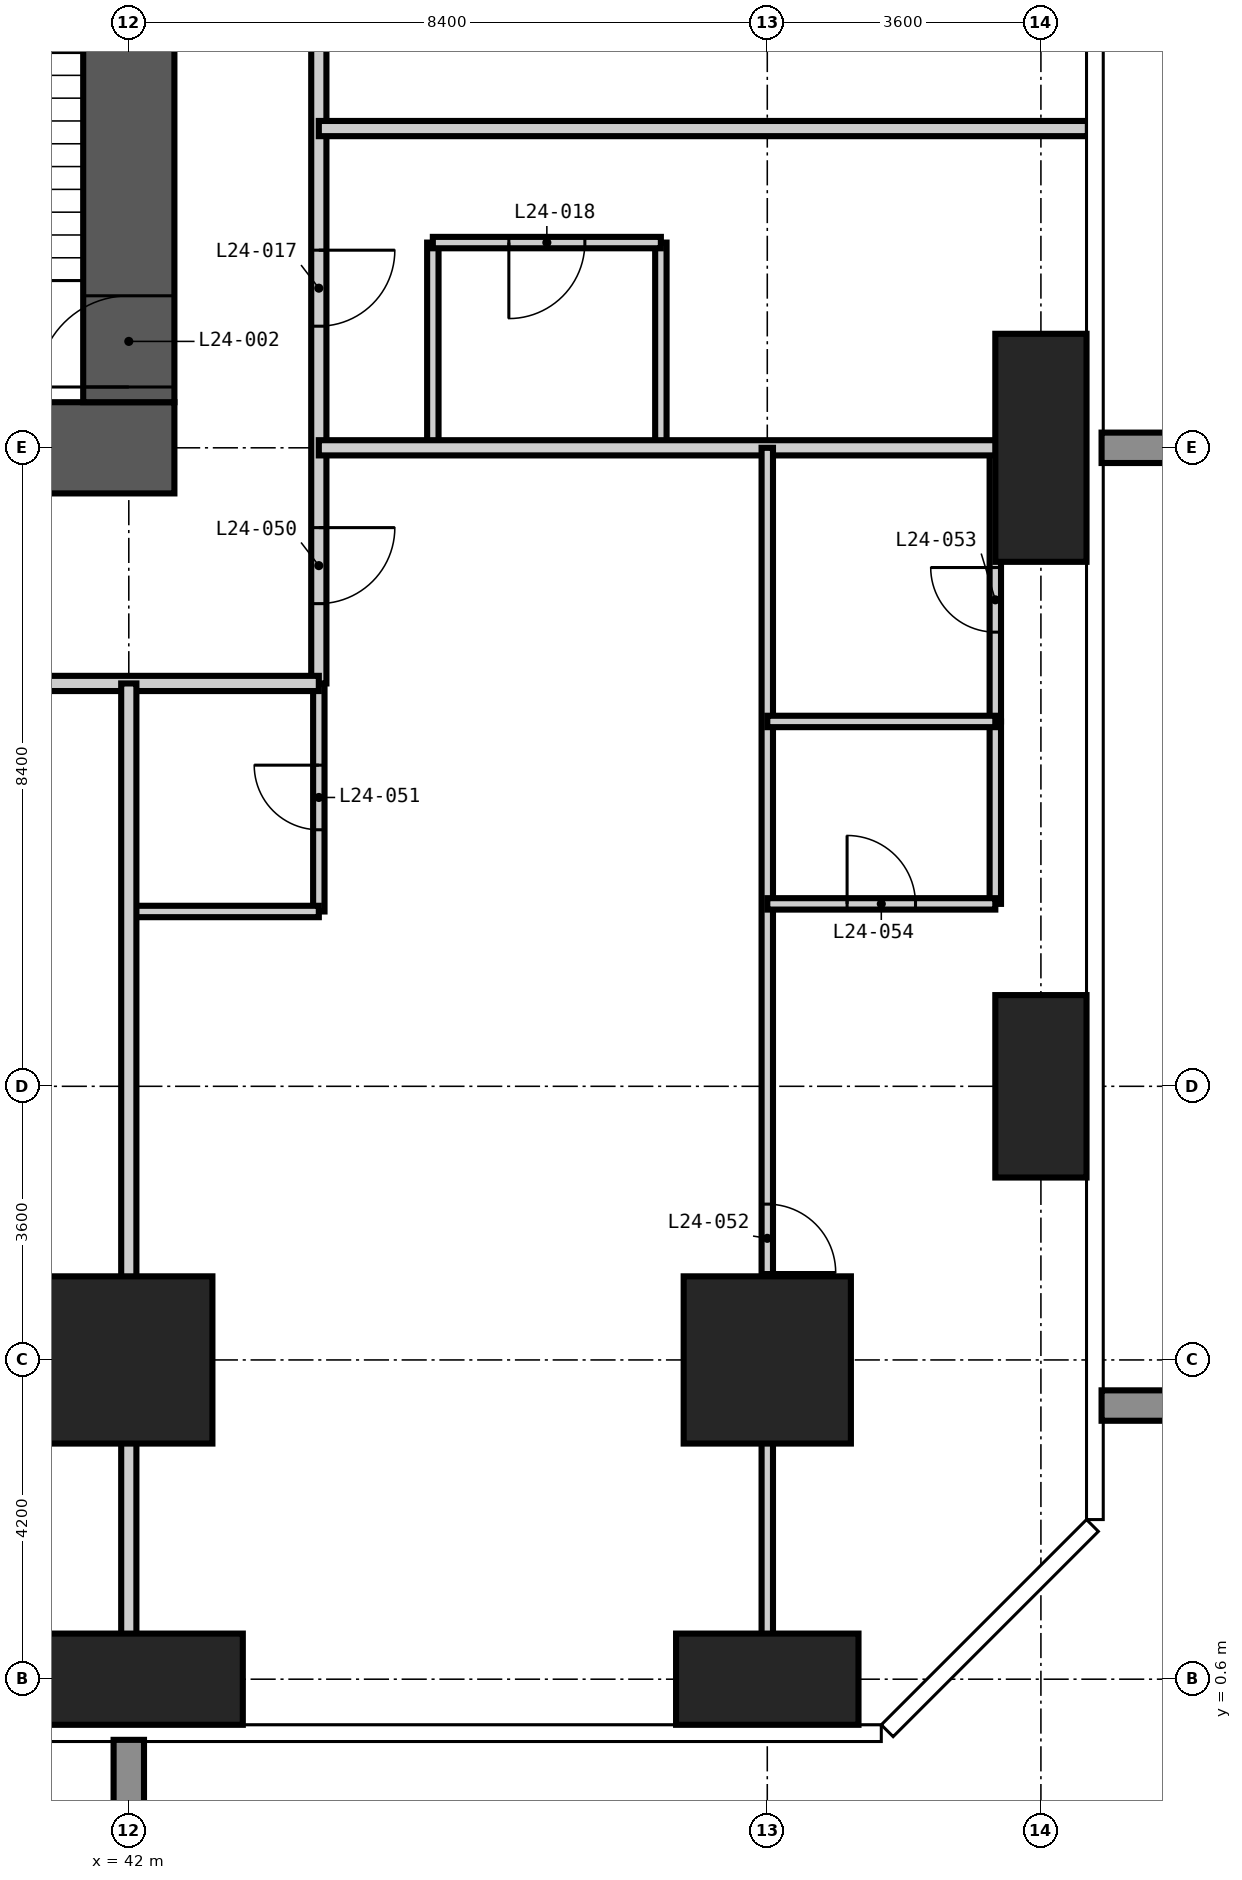
"""IFC4 building model, lengths in metres.
Left out: names, types, materials, properties, quantities, classifications, styles, units other than length and angle.
Written with IfcOpenShell. Run it as: python <this file> out.ifc"""

import sys

from ifc_helpers import new_model, si_unit, direction, frame, frame_2d, origin, origin_2d, place, context, subcontext, project, spatial, rectangle, extrude, element, fill, save


model = new_model("IFC4")
c1 = context("Model", 3, precision=1e-05, world=origin(), true_north=direction((0.0, 1.0)))
c2 = subcontext(c1, "Body", "Model", "MODEL_VIEW")
j1 = project(units=[si_unit("LENGTHUNIT", "METRE"), si_unit("PLANEANGLEUNIT", "RADIAN")], contexts=[c1])
p1 = place(None, origin())
s1 = spatial("IfcSite", under=j1, at=p1, CompositionType="ELEMENT")
p2 = place(p1, origin())
s2 = spatial("IfcBuilding", under=s1, at=p2, CompositionType="ELEMENT")
p3 = place(p2, frame((0.0, 0.0, 97.2)))
s3 = spatial("IfcBuildingStorey", under=s2, at=p3, CompositionType="ELEMENT", Elevation=97.2)
p4 = place(p3, frame((42.0, 0.6, -0.35), z_axis=(0.0, 0.0, 1.0), x_axis=(1.0, 0.0, 0.0)))
e1 = element("IfcColumn", 1, at=p4, inside=s3, PredefinedType="COLUMN", context=c2, shape_type="SweptSolid", body=[
    extrude(rectangle(XDim=3.0, YDim=1.2, at=origin_2d()), origin(), (0.0, 0.0, 1.0), 3.6),
])
p5 = place(p3, frame((42.0, 4.8, -0.35), z_axis=(0.0, 0.0, 1.0), x_axis=(1.0, 0.0, 0.0)))
e2 = element("IfcColumn", 2, at=p5, inside=s3, PredefinedType="COLUMN", context=c2, shape_type="SweptSolid", body=[
    extrude(rectangle(XDim=2.2, YDim=2.2, at=origin_2d()), origin(), (0.0, 0.0, 1.0), 3.6),
])
p6 = place(p3, frame((50.4, 0.6, -0.35), z_axis=(0.0, 0.0, 1.0), x_axis=(1.0, 0.0, 0.0)))
e3 = element("IfcColumn", 3, at=p6, inside=s3, PredefinedType="COLUMN", context=c2, shape_type="SweptSolid", body=[
    extrude(rectangle(XDim=2.4, YDim=1.2, at=origin_2d()), origin(), (0.0, 0.0, 1.0), 3.6),
])
p7 = place(p3, frame((50.4, 4.8, -0.35), z_axis=(0.0, 0.0, 1.0), x_axis=(1.0, 0.0, 0.0)))
e4 = element("IfcColumn", 4, at=p7, inside=s3, PredefinedType="COLUMN", context=c2, shape_type="SweptSolid", body=[
    extrude(rectangle(XDim=2.2, YDim=2.2, at=origin_2d()), origin(), (0.0, 0.0, 1.0), 3.6),
])
p8 = place(p3, frame((54.0, 8.4, -0.35), z_axis=(0.0, 0.0, 1.0), x_axis=(1.0, 0.0, 0.0)))
e5 = element("IfcColumn", 5, at=p8, inside=s3, PredefinedType="COLUMN", context=c2, shape_type="SweptSolid", body=[
    extrude(rectangle(XDim=1.2, YDim=2.4, at=origin_2d()), origin(), (0.0, 0.0, 1.0), 3.6),
])
p9 = place(p3, frame((54.0, 16.8, -0.35), z_axis=(0.0, 0.0, 1.0), x_axis=(1.0, 0.0, 0.0)))
e6 = element("IfcColumn", 6, at=p9, inside=s3, PredefinedType="COLUMN", context=c2, shape_type="SweptSolid", body=[
    extrude(rectangle(XDim=1.2, YDim=3.0, at=origin_2d()), origin(), (0.0, 0.0, 1.0), 3.6),
])
p10 = place(p3, frame((16.2, 16.8, -0.35), z_axis=(0.0, 0.0, 1.0), x_axis=(1.0, 0.0, 0.0)))
e7 = element("IfcWall", 7, at=p10, inside=s3, PredefinedType="SHEAR", context=c2, shape_type="SweptSolid", body=[
    extrude(rectangle(XDim=26.4, YDim=1.2, at=frame_2d((13.2, 0.0))), origin(), (0.0, 0.0, 1.0), 3.6),
])
p11 = place(p10, frame((12.7, 0.0, 0.35)))
e8 = element("IfcOpeningElement", 8, at=p11, cuts=e7, PredefinedType="OPENING", context=c2, shape_type="SweptSolid", body=[
    extrude(rectangle(XDim=1.0, YDim=2.1, at=frame_2d((0.5, 1.05))), frame((0.0, 0.61, 0.0), z_axis=(0.0, -1.0, 0.0), x_axis=(1.0, 0.0, 0.0)), (0.0, 0.0, 1.0), 1.22),
])
p12 = place(p10, frame((19.0, 0.0, 0.35)))
e9 = element("IfcOpeningElement", 9, at=p12, cuts=e7, PredefinedType="OPENING", context=c2, shape_type="SweptSolid", body=[
    extrude(rectangle(XDim=1.0, YDim=2.1, at=frame_2d((0.5, 1.05))), frame((0.0, 0.61, 0.0), z_axis=(0.0, -1.0, 0.0), x_axis=(1.0, 0.0, 0.0)), (0.0, 0.0, 1.0), 1.22),
])
p13 = place(p3, frame((42.0, 17.4, -0.35), z_axis=(0.0, 0.0, 1.0), x_axis=(0.0, 1.0, 0.0)))
e10 = element("IfcWall", 10, at=p13, inside=s3, PredefinedType="SHEAR", context=c2, shape_type="SweptSolid", body=[
    extrude(rectangle(XDim=24.0, YDim=1.2, at=frame_2d((12.0, 0.0))), origin(), (0.0, 0.0, 1.0), 3.6),
])
p14 = place(p13, frame((0.2, 0.0, 0.35)))
e11 = element("IfcOpeningElement", 11, at=p14, cuts=e10, PredefinedType="OPENING", context=c2, shape_type="SweptSolid", body=[
    extrude(rectangle(XDim=1.2, YDim=2.2, at=frame_2d((0.6, 1.1))), frame((0.0, 0.61, 0.0), z_axis=(0.0, -1.0, 0.0), x_axis=(1.0, 0.0, 0.0)), (0.0, 0.0, 1.0), 1.22),
])
p15 = place(p13, frame((11.1, 0.0, 0.35)))
e12 = element("IfcOpeningElement", 12, at=p15, cuts=e10, PredefinedType="OPENING", context=c2, shape_type="SweptSolid", body=[
    extrude(rectangle(XDim=1.8, YDim=2.2, at=frame_2d((0.9, 1.1))), frame((0.0, 0.61, 0.0), z_axis=(0.0, -1.0, 0.0), x_axis=(1.0, 0.0, 0.0)), (0.0, 0.0, 1.0), 1.22),
])
p16 = place(p13, frame((19.9, 0.0, 0.35)))
e13 = element("IfcOpeningElement", 13, at=p16, cuts=e10, PredefinedType="OPENING", context=c2, shape_type="SweptSolid", body=[
    extrude(rectangle(XDim=1.0, YDim=2.1, at=frame_2d((0.5, 1.05))), frame((0.0, 0.61, 0.0), z_axis=(0.0, -1.0, 0.0), x_axis=(1.0, 0.0, 0.0)), (0.0, 0.0, 1.0), 1.22),
])
p17 = place(p3, frame((44.5, 10.7, 0.0), z_axis=(0.0, 0.0, 1.0), x_axis=(0.0, 1.0, 0.0)))
e14 = element("IfcWall", 14, at=p17, inside=s3, PredefinedType="PARTITIONING", context=c2, shape_type="SweptSolid", body=[
    extrude(rectangle(XDim=3.0, YDim=0.15, at=frame_2d((1.5, 0.0))), origin(), (0.0, 0.0, 1.0), 3.25),
])
p18 = place(p17, frame((1.075, 0.0, 0.0)))
e15 = element("IfcOpeningElement", 15, at=p18, cuts=e14, PredefinedType="OPENING", context=c2, shape_type="SweptSolid", body=[
    extrude(rectangle(XDim=0.85, YDim=2.1, at=frame_2d((0.425, 1.05))), frame((0.0, 0.085, 0.0), z_axis=(0.0, -1.0, 0.0), x_axis=(1.0, 0.0, 0.0)), (0.0, 0.0, 1.0), 0.17),
])
for number, where, z_axis, x_axis in (
    (16, (46.0, 16.8, 0.0), (0.0, 0.0, 1.0), (0.0, 1.0, 0.0)),
    (17, (49.0, 16.8, 0.0), (0.0, 0.0, 1.0), (0.0, 1.0, 0.0)),
):
    element("IfcWall", number, at=place(p3, frame(where, z_axis=z_axis, x_axis=x_axis)), inside=s3, PredefinedType="PARTITIONING", context=c2, shape_type="SweptSolid", body=[
        extrude(rectangle(XDim=2.7, YDim=0.15, at=frame_2d((1.35, 0.0))), origin(), (0.0, 0.0, 1.0), 3.25),
    ])
p19 = place(p3, frame((53.4, 13.2, 0.0), z_axis=(0.0, 0.0, 1.0), x_axis=(0.0, 1.0, 0.0)))
e18 = element("IfcWall", 18, at=p19, inside=s3, PredefinedType="PARTITIONING", context=c2, shape_type="SweptSolid", body=[
    extrude(rectangle(XDim=3.6, YDim=0.15, at=frame_2d((1.8, 0.0))), origin(), (0.0, 0.0, 1.0), 3.25),
])
p20 = place(p19, frame((1.175, 0.0, 0.0)))
e19 = element("IfcOpeningElement", 19, at=p20, cuts=e18, PredefinedType="OPENING", context=c2, shape_type="SweptSolid", body=[
    extrude(rectangle(XDim=0.85, YDim=2.1, at=frame_2d((0.425, 1.05))), frame((0.0, 0.085, 0.0), z_axis=(0.0, -1.0, 0.0), x_axis=(1.0, 0.0, 0.0)), (0.0, 0.0, 1.0), 0.17),
])
p21 = place(p3, frame((42.0, 10.7, 0.0), z_axis=(0.0, 0.0, 1.0), x_axis=(1.0, 0.0, 0.0)))
e20 = element("IfcWall", 20, at=p21, inside=s3, PredefinedType="PARTITIONING", context=c2, shape_type="SweptSolid", body=[
    extrude(rectangle(XDim=2.5, YDim=0.15, at=frame_2d((1.25, 0.0))), origin(), (0.0, 0.0, 1.0), 3.25),
])
p22 = place(p3, frame((46.0, 19.5, 0.0), z_axis=(0.0, 0.0, 1.0), x_axis=(1.0, 0.0, 0.0)))
e21 = element("IfcWall", 21, at=p22, inside=s3, PredefinedType="PARTITIONING", context=c2, shape_type="SweptSolid", body=[
    extrude(rectangle(XDim=3.0, YDim=0.15, at=frame_2d((1.5, 0.0))), origin(), (0.0, 0.0, 1.0), 3.25),
])
p23 = place(p22, frame((1.0, 0.0, 0.0)))
e22 = element("IfcOpeningElement", 22, at=p23, cuts=e21, PredefinedType="OPENING", context=c2, shape_type="SweptSolid", body=[
    extrude(rectangle(XDim=1.0, YDim=2.1, at=frame_2d((0.5, 1.05))), frame((0.0, 0.085, 0.0), z_axis=(0.0, -1.0, 0.0), x_axis=(1.0, 0.0, 0.0)), (0.0, 0.0, 1.0), 0.17),
])
p24 = place(p3, frame((44.5, 45.7, 0.0), z_axis=(0.0, 0.0, 1.0), x_axis=(0.0, -1.0, 0.0)))
e23 = element("IfcWall", 23, at=p24, inside=s3, PredefinedType="PARTITIONING", context=c2, shape_type="SweptSolid", body=[
    extrude(rectangle(XDim=32.0, YDim=0.2, at=frame_2d((16.0, 0.0))), origin(), (0.0, 0.0, 1.0), 3.25),
])
p25 = place(p24, frame((26.3, 0.0, 0.0)))
e24 = element("IfcOpeningElement", 24, at=p25, cuts=e23, PredefinedType="OPENING", context=c2, shape_type="SweptSolid", body=[
    extrude(rectangle(XDim=1.0, YDim=2.2, at=frame_2d((0.5, 1.1))), frame((0.0, 0.11, 0.0), z_axis=(0.0, -1.0, 0.0), x_axis=(1.0, 0.0, 0.0)), (0.0, 0.0, 1.0), 0.22),
])
p26 = place(p24, frame((20.0, 0.0, 0.0)))
e25 = element("IfcOpeningElement", 25, at=p26, cuts=e23, PredefinedType="OPENING", context=c2, shape_type="SweptSolid", body=[
    extrude(rectangle(XDim=1.0, YDim=2.2, at=frame_2d((0.5, 1.1))), frame((0.0, 0.11, 0.0), z_axis=(0.0, -1.0, 0.0), x_axis=(1.0, 0.0, 0.0)), (0.0, 0.0, 1.0), 0.22),
])
p27 = place(p24, frame((11.6, 0.0, 0.0)))
e26 = element("IfcOpeningElement", 26, at=p27, cuts=e23, PredefinedType="OPENING", context=c2, shape_type="SweptSolid", body=[
    extrude(rectangle(XDim=1.0, YDim=2.2, at=frame_2d((0.5, 1.1))), frame((0.0, 0.11, 0.0), z_axis=(0.0, -1.0, 0.0), x_axis=(1.0, 0.0, 0.0)), (0.0, 0.0, 1.0), 0.22),
])
p28 = place(p24, frame((5.3, 0.0, 0.0)))
e27 = element("IfcOpeningElement", 27, at=p28, cuts=e23, PredefinedType="OPENING", context=c2, shape_type="SweptSolid", body=[
    extrude(rectangle(XDim=1.0, YDim=2.2, at=frame_2d((0.5, 1.1))), frame((0.0, 0.11, 0.0), z_axis=(0.0, -1.0, 0.0), x_axis=(1.0, 0.0, 0.0)), (0.0, 0.0, 1.0), 0.22),
])
p29 = place(p24, frame((29.95, 0.0, 0.0)))
e28 = element("IfcOpeningElement", 28, at=p29, cuts=e23, PredefinedType="OPENING", context=c2, shape_type="SweptSolid", body=[
    extrude(rectangle(XDim=1.0, YDim=2.2, at=frame_2d((0.5, 1.1))), frame((0.0, 0.11, 0.0), z_axis=(0.0, -1.0, 0.0), x_axis=(1.0, 0.0, 0.0)), (0.0, 0.0, 1.0), 0.22),
])
p30 = place(p24, frame((1.35, 0.0, 0.0)))
e29 = element("IfcOpeningElement", 29, at=p30, cuts=e23, PredefinedType="OPENING", context=c2, shape_type="SweptSolid", body=[
    extrude(rectangle(XDim=1.0, YDim=2.2, at=frame_2d((0.5, 1.1))), frame((0.0, 0.11, 0.0), z_axis=(0.0, -1.0, 0.0), x_axis=(1.0, 0.0, 0.0)), (0.0, 0.0, 1.0), 0.22),
])
p31 = place(p3, frame((44.5, 13.7, 0.0), z_axis=(0.0, 0.0, 1.0), x_axis=(-1.0, 0.0, 0.0)))
e30 = element("IfcWall", 30, at=p31, inside=s3, PredefinedType="PARTITIONING", context=c2, shape_type="SweptSolid", body=[
    extrude(rectangle(XDim=31.9, YDim=0.2, at=frame_2d((15.95, 0.0))), origin(), (0.0, 0.0, 1.0), 3.25),
])
p32 = place(p31, frame((23.0, 0.0, 0.0)))
e31 = element("IfcOpeningElement", 31, at=p32, cuts=e30, PredefinedType="OPENING", context=c2, shape_type="SweptSolid", body=[
    extrude(rectangle(XDim=1.0, YDim=2.2, at=frame_2d((0.5, 1.1))), frame((0.0, 0.11, 0.0), z_axis=(0.0, -1.0, 0.0), x_axis=(1.0, 0.0, 0.0)), (0.0, 0.0, 1.0), 0.22),
])
p33 = place(p31, frame((14.6, 0.0, 0.0)))
e32 = element("IfcOpeningElement", 32, at=p33, cuts=e30, PredefinedType="OPENING", context=c2, shape_type="SweptSolid", body=[
    extrude(rectangle(XDim=1.0, YDim=2.2, at=frame_2d((0.5, 1.1))), frame((0.0, 0.11, 0.0), z_axis=(0.0, -1.0, 0.0), x_axis=(1.0, 0.0, 0.0)), (0.0, 0.0, 1.0), 0.22),
])
p34 = place(p31, frame((6.2, 0.0, 0.0)))
e33 = element("IfcOpeningElement", 33, at=p34, cuts=e30, PredefinedType="OPENING", context=c2, shape_type="SweptSolid", body=[
    extrude(rectangle(XDim=1.0, YDim=2.2, at=frame_2d((0.5, 1.1))), frame((0.0, 0.11, 0.0), z_axis=(0.0, -1.0, 0.0), x_axis=(1.0, 0.0, 0.0)), (0.0, 0.0, 1.0), 0.22),
])
p35 = place(p3, frame((42.0, -0.018, 0.0), z_axis=(0.0, 0.0, 1.0), x_axis=(0.0, 1.0, 0.0)))
e34 = element("IfcWall", 34, at=p35, inside=s3, PredefinedType="PARTITIONING", context=c2, shape_type="SweptSolid", body=[
    extrude(rectangle(XDim=13.718, YDim=0.2, at=frame_2d((6.859, 0.0))), origin(), (0.0, 0.0, 1.0), 3.25),
])
for number, where, z_axis, x_axis in (
    (35, (44.5, 16.8, 0.0), (0.0, 0.0, 1.0), (1.0, 0.0, 0.0)),
    (36, (44.5, 21.0, 0.0), (0.0, 0.0, 1.0), (1.0, 0.0, 0.0)),
):
    element("IfcWall", number, at=place(p3, frame(where, z_axis=z_axis, x_axis=x_axis)), inside=s3, PredefinedType="PARTITIONING", context=c2, shape_type="SweptSolid", body=[
        extrude(rectangle(XDim=10.118, YDim=0.2, at=frame_2d((5.059, 0.0))), origin(), (0.0, 0.0, 1.0), 3.25),
    ])
p36 = place(p3, frame((50.4, -0.018, 0.0), z_axis=(0.0, 0.0, 1.0), x_axis=(0.0, 1.0, 0.0)))
e37 = element("IfcWall", 37, at=p36, inside=s3, PredefinedType="PARTITIONING", context=c2, shape_type="SweptSolid", body=[
    extrude(rectangle(XDim=16.818, YDim=0.15, at=frame_2d((8.409, 0.0))), origin(), (0.0, 0.0, 1.0), 3.25),
])
p37 = place(p36, frame((5.968, 0.0, 0.0)))
e38 = element("IfcOpeningElement", 38, at=p37, cuts=e37, PredefinedType="OPENING", context=c2, shape_type="SweptSolid", body=[
    extrude(rectangle(XDim=0.9, YDim=2.1, at=frame_2d((0.45, 1.05))), frame((0.0, 0.085, 0.0), z_axis=(0.0, -1.0, 0.0), x_axis=(1.0, 0.0, 0.0)), (0.0, 0.0, 1.0), 0.17),
])
p38 = place(p3, frame((53.4, 10.8, 0.0), z_axis=(0.0, 0.0, 1.0), x_axis=(0.0, 1.0, 0.0)))
e39 = element("IfcWall", 39, at=p38, inside=s3, PredefinedType="PARTITIONING", context=c2, shape_type="SweptSolid", body=[
    extrude(rectangle(XDim=2.4, YDim=0.15, at=frame_2d((1.2, 0.0))), origin(), (0.0, 0.0, 1.0), 3.25),
])
p39 = place(p3, frame((50.4, 10.8, 0.0), z_axis=(0.0, 0.0, 1.0), x_axis=(1.0, 0.0, 0.0)))
e40 = element("IfcWall", 40, at=p39, inside=s3, PredefinedType="PARTITIONING", context=c2, shape_type="SweptSolid", body=[
    extrude(rectangle(XDim=3.0, YDim=0.15, at=frame_2d((1.5, 0.0))), origin(), (0.0, 0.0, 1.0), 3.25),
])
p40 = place(p39, frame((1.05, 0.0, 0.0)))
e41 = element("IfcOpeningElement", 41, at=p40, cuts=e40, PredefinedType="OPENING", context=c2, shape_type="SweptSolid", body=[
    extrude(rectangle(XDim=0.9, YDim=2.1, at=frame_2d((0.45, 1.05))), frame((0.0, 0.085, 0.0), z_axis=(0.0, -1.0, 0.0), x_axis=(1.0, 0.0, 0.0)), (0.0, 0.0, 1.0), 0.17),
])
p41 = place(p3, frame((50.4, 13.2, 0.0), z_axis=(0.0, 0.0, 1.0), x_axis=(1.0, 0.0, 0.0)))
e42 = element("IfcWall", 42, at=p41, inside=s3, PredefinedType="PARTITIONING", context=c2, shape_type="SweptSolid", body=[
    extrude(rectangle(XDim=3.0, YDim=0.15, at=frame_2d((1.5, 0.0))), origin(), (0.0, 0.0, 1.0), 3.25),
])
p42 = place(p14, origin())
e43 = element("IfcDoor", 43, at=p42, inside=s3, OperationType="SINGLE_SWING_LEFT", PredefinedType="DOOR", context=c2, shape_type="SweptSolid", body=[
    extrude(rectangle(XDim=1.2, YDim=2.2, at=frame_2d((0.6, 1.1))), frame((0.0, 0.025, 0.0), z_axis=(0.0, -1.0, 0.0), x_axis=(1.0, 0.0, 0.0)), (0.0, 0.0, 1.0), 0.05),
])
fill(e11, e43)
p43 = place(p25, origin())
e44 = element("IfcDoor", 44, at=p43, inside=s3, OperationType="SINGLE_SWING_LEFT", PredefinedType="DOOR", context=c2, shape_type="SweptSolid", body=[
    extrude(rectangle(XDim=1.0, YDim=2.2, at=frame_2d((0.5, 1.1))), frame((0.0, 0.025, 0.0), z_axis=(0.0, -1.0, 0.0), x_axis=(1.0, 0.0, 0.0)), (0.0, 0.0, 1.0), 0.05),
])
fill(e24, e44)
p44 = place(p23, frame((1.0, 0.0, 0.0), z_axis=(0.0, 0.0, 1.0), x_axis=(-1.0, 0.0, 0.0)))
e45 = element("IfcDoor", 45, at=p44, inside=s3, OperationType="SINGLE_SWING_RIGHT", PredefinedType="DOOR", context=c2, shape_type="SweptSolid", body=[
    extrude(rectangle(XDim=1.0, YDim=2.1, at=frame_2d((0.5, 1.05))), frame((0.0, 0.025, 0.0), z_axis=(0.0, -1.0, 0.0), x_axis=(1.0, 0.0, 0.0)), (0.0, 0.0, 1.0), 0.05),
])
fill(e22, e45)
p45 = place(p29, origin())
e46 = element("IfcDoor", 46, at=p45, inside=s3, OperationType="SINGLE_SWING_LEFT", PredefinedType="DOOR", context=c2, shape_type="SweptSolid", body=[
    extrude(rectangle(XDim=1.0, YDim=2.2, at=frame_2d((0.5, 1.1))), frame((0.0, 0.025, 0.0), z_axis=(0.0, -1.0, 0.0), x_axis=(1.0, 0.0, 0.0)), (0.0, 0.0, 1.0), 0.05),
])
fill(e28, e46)
p46 = place(p18, origin())
e47 = element("IfcDoor", 47, at=p46, inside=s3, OperationType="SINGLE_SWING_RIGHT", PredefinedType="DOOR", context=c2, shape_type="SweptSolid", body=[
    extrude(rectangle(XDim=0.85, YDim=2.1, at=frame_2d((0.425, 1.05))), frame((0.0, 0.025, 0.0), z_axis=(0.0, -1.0, 0.0), x_axis=(1.0, 0.0, 0.0)), (0.0, 0.0, 1.0), 0.05),
])
fill(e15, e47)
p47 = place(p37, frame((0.9, 0.0, 0.0), z_axis=(0.0, 0.0, 1.0), x_axis=(-1.0, 0.0, 0.0)))
e48 = element("IfcDoor", 48, at=p47, inside=s3, OperationType="SINGLE_SWING_RIGHT", PredefinedType="DOOR", context=c2, shape_type="SweptSolid", body=[
    extrude(rectangle(XDim=0.9, YDim=2.1, at=frame_2d((0.45, 1.05))), frame((0.0, 0.025, 0.0), z_axis=(0.0, -1.0, 0.0), x_axis=(1.0, 0.0, 0.0)), (0.0, 0.0, 1.0), 0.05),
])
fill(e38, e48)
p48 = place(p20, origin())
e49 = element("IfcDoor", 49, at=p48, inside=s3, OperationType="SINGLE_SWING_RIGHT", PredefinedType="DOOR", context=c2, shape_type="SweptSolid", body=[
    extrude(rectangle(XDim=0.85, YDim=2.1, at=frame_2d((0.425, 1.05))), frame((0.0, 0.025, 0.0), z_axis=(0.0, -1.0, 0.0), x_axis=(1.0, 0.0, 0.0)), (0.0, 0.0, 1.0), 0.05),
])
fill(e19, e49)
p49 = place(p40, origin())
e50 = element("IfcDoor", 50, at=p49, inside=s3, OperationType="SINGLE_SWING_LEFT", PredefinedType="DOOR", context=c2, shape_type="SweptSolid", body=[
    extrude(rectangle(XDim=0.9, YDim=2.1, at=frame_2d((0.45, 1.05))), frame((0.0, 0.025, 0.0), z_axis=(0.0, -1.0, 0.0), x_axis=(1.0, 0.0, 0.0)), (0.0, 0.0, 1.0), 0.05),
])
fill(e41, e50)
save(model, sys.argv[1])
